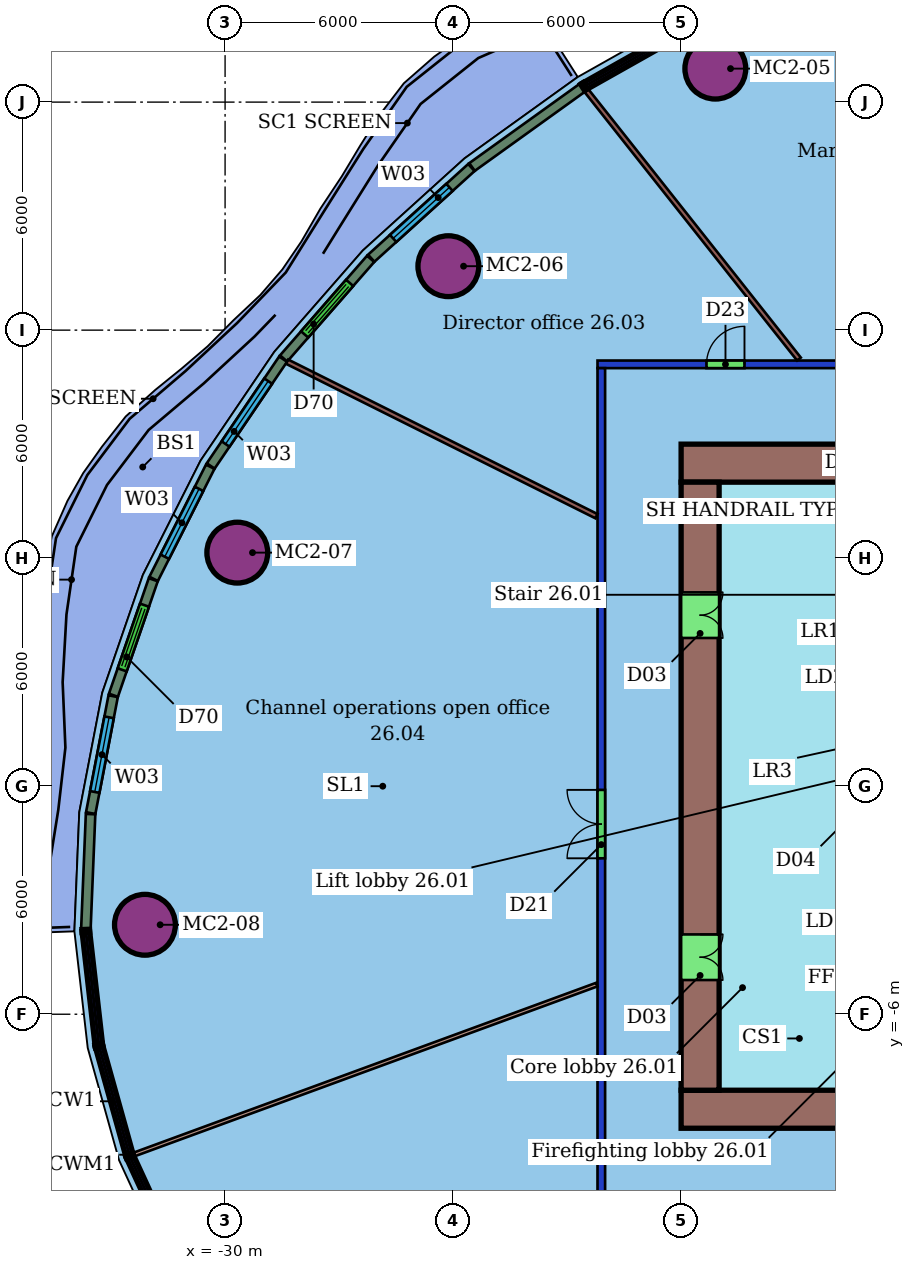
"""IFC4 building model, lengths in metres.
Left out: names, types, materials, properties, quantities, classifications, styles, units other than length and angle.
Written with IfcOpenShell. Run it as: python <this file> out.ifc"""

import sys

from ifc_helpers import new_model, si_unit, direction, frame, frame_2d, origin, origin_2d, place, context, subcontext, project, spatial, rectangle, hollow_circle, extrude, element, fill, save


model = new_model("IFC4")
c1 = context("Model", 3, precision=1e-05, world=origin(), true_north=direction((0.0, 1.0)))
c2 = subcontext(c1, "Body", "Model", "MODEL_VIEW")
j1 = project(units=[si_unit("LENGTHUNIT", "METRE"), si_unit("PLANEANGLEUNIT", "RADIAN")], contexts=[c1])
p1 = place(None, origin())
s1 = spatial("IfcSite", under=j1, at=p1, CompositionType="ELEMENT")
p2 = place(p1, origin())
s2 = spatial("IfcBuilding", under=s1, at=p2, CompositionType="ELEMENT")
p3 = place(p2, frame((0.0, 0.0, 113.8)))
s3 = spatial("IfcBuildingStorey", under=s2, at=p3, CompositionType="ELEMENT", Elevation=113.8)
for number, where, z_axis, x_axis in (
    (1, (-17.1, 18.881, 0.0), (0.0, 0.0, 1.0), (1.0, 0.0, 0.0)),
    (2, (-24.125, 13.683, 0.0), (0.0, 0.0, 1.0), (1.0, 0.0, 0.0)),
    (3, (-29.679, 6.146, 0.0), (0.0, 0.0, 1.0), (1.0, 0.0, 0.0)),
    (4, (-32.109, -3.646, 0.0), (0.0, 0.0, 1.0), (1.0, 0.0, 0.0)),
):
    element("IfcColumn", number, at=place(p3, frame(where, z_axis=z_axis, x_axis=x_axis)), inside=s3, PredefinedType="COLUMN", context=c2, shape_type="SweptSolid", body=[
        extrude(hollow_circle(Radius=0.8, WallThickness=0.055, at=origin_2d()), origin(), (0.0, 0.0, 1.0), 3.45),
    ])
p4 = place(p3, frame((-20.1, -11.0, 0.0), z_axis=(0.0, 0.0, 1.0), x_axis=(0.0, 1.0, 0.0)))
e5 = element("IfcWall", 5, at=p4, inside=s3, PredefinedType="PARTITIONING", context=c2, shape_type="SweptSolid", body=[
    extrude(rectangle(XDim=22.0, YDim=0.2, at=frame_2d((11.0, 0.0))), origin(), (0.0, 0.0, 1.0), 3.0),
])
p5 = place(p4, frame((9.103, 0.0, 0.0)))
e6 = element("IfcOpeningElement", 6, at=p5, cuts=e5, PredefinedType="OPENING", context=c2, shape_type="SweptSolid", body=[
    extrude(rectangle(XDim=1.8, YDim=2.1, at=frame_2d((0.9, 1.05))), frame((0.0, 0.11, 0.0), z_axis=(0.0, -1.0, 0.0), x_axis=(1.0, 0.0, 0.0)), (0.0, 0.0, 1.0), 0.22),
])
p6 = place(p3, frame((-20.2, 11.1, 0.0), z_axis=(0.0, 0.0, 1.0), x_axis=(1.0, 0.0, 0.0)))
e7 = element("IfcWall", 7, at=p6, inside=s3, PredefinedType="PARTITIONING", context=c2, shape_type="SweptSolid", body=[
    extrude(rectangle(XDim=28.4, YDim=0.2, at=frame_2d((14.2, 0.0))), origin(), (0.0, 0.0, 1.0), 3.0),
])
p7 = place(p6, frame((20.417, 0.0, 0.0)))
e8 = element("IfcOpeningElement", 8, at=p7, cuts=e7, PredefinedType="OPENING", context=c2, shape_type="SweptSolid", body=[
    extrude(rectangle(XDim=1.8, YDim=2.1, at=frame_2d((0.9, 1.05))), frame((0.0, 0.11, 0.0), z_axis=(0.0, -1.0, 0.0), x_axis=(1.0, 0.0, 0.0)), (0.0, 0.0, 1.0), 0.22),
])
p8 = place(p6, frame((7.743, 0.0, 0.0)))
e9 = element("IfcOpeningElement", 9, at=p8, cuts=e7, PredefinedType="OPENING", context=c2, shape_type="SweptSolid", body=[
    extrude(rectangle(XDim=1.0, YDim=2.1, at=frame_2d((0.5, 1.05))), frame((0.0, 0.11, 0.0), z_axis=(0.0, -1.0, 0.0), x_axis=(1.0, 0.0, 0.0)), (0.0, 0.0, 1.0), 0.22),
])
p9 = place(p6, frame((2.867, 0.0, 0.0)))
e10 = element("IfcOpeningElement", 10, at=p9, cuts=e7, PredefinedType="OPENING", context=c2, shape_type="SweptSolid", body=[
    extrude(rectangle(XDim=1.0, YDim=2.4, at=frame_2d((0.5, 1.2))), frame((0.0, 0.11, 0.0), z_axis=(0.0, -1.0, 0.0), x_axis=(1.0, 0.0, 0.0)), (0.0, 0.0, 1.0), 0.22),
])
p10 = place(p3, frame((-20.491, 18.302, 0.0), z_axis=(0.0, 0.0, 1.0), x_axis=(0.620744588947, -0.784012854036, 0.0)))
e11 = element("IfcWall", 11, at=p10, inside=s3, PredefinedType="PARTITIONING", context=c2, shape_type="SweptSolid", body=[
    extrude(rectangle(XDim=9.009, YDim=0.125, at=frame_2d((4.505, 0.0))), origin(), (0.0, 0.0, 1.0), 3.45),
])
p11 = place(p3, frame((-28.368, 11.17, 0.0), z_axis=(0.0, 0.0, 1.0), x_axis=(0.894647115325, -0.446773476205, 0.0)))
e12 = element("IfcWall", 12, at=p11, inside=s3, PredefinedType="PARTITIONING", context=c2, shape_type="SweptSolid", body=[
    extrude(rectangle(XDim=9.098, YDim=0.125, at=frame_2d((4.549, 0.0))), origin(), (0.0, 0.0, 1.0), 3.45),
])
p12 = place(p3, frame((-32.393, -9.69, 0.0), z_axis=(0.0, 0.0, 1.0), x_axis=(0.93873651108, 0.344635695722, 0.0)))
e13 = element("IfcWall", 13, at=p12, inside=s3, PredefinedType="PARTITIONING", context=c2, shape_type="SweptSolid", body=[
    extrude(rectangle(XDim=12.97, YDim=0.1, at=frame_2d((6.485, 0.0))), origin(), (0.0, 0.0, 1.0), 3.45),
])
p13 = place(p3, frame((-20.603, 18.375, 0.0), z_axis=(0.0, 0.0, 1.0), x_axis=(-0.812029550547, -0.583616320058, 0.0)))
e14 = element("IfcWall", 14, at=p13, inside=s3, PredefinedType="SOLIDWALL", context=c2, shape_type="SweptSolid", body=[
    extrude(rectangle(XDim=3.57, YDim=0.25, at=frame_2d((1.785, 0.0))), origin(), (0.0, 0.0, 1.0), 3.05),
])
p14 = place(p3, frame((-23.519, 16.278, 0.0), z_axis=(0.0, 0.0, 1.0), x_axis=(-0.7412037287, -0.67128014462, 0.0)))
e15 = element("IfcWall", 15, at=p14, inside=s3, PredefinedType="SOLIDWALL", context=c2, shape_type="SweptSolid", body=[
    extrude(rectangle(XDim=3.554, YDim=0.25, at=frame_2d((1.777, 0.0))), origin(), (0.0, 0.0, 1.0), 3.05),
])
p15 = place(p14, frame((0.777, 0.0, 0.9)))
e16 = element("IfcOpeningElement", 16, at=p15, cuts=e15, PredefinedType="OPENING", context=c2, shape_type="SweptSolid", body=[
    extrude(rectangle(XDim=2.0, YDim=2.1, at=frame_2d((1.0, 1.05))), frame((0.0, 0.135, 0.0), z_axis=(0.0, -1.0, 0.0), x_axis=(1.0, 0.0, 0.0)), (0.0, 0.0, 1.0), 0.27),
])
p16 = place(p3, frame((-26.17, 13.876, 0.0), z_axis=(0.0, 0.0, 1.0), x_axis=(-0.657903433386, -0.753102298721, 0.0)))
e17 = element("IfcWall", 17, at=p16, inside=s3, PredefinedType="SOLIDWALL", context=c2, shape_type="SweptSolid", body=[
    extrude(rectangle(XDim=3.48, YDim=0.25, at=frame_2d((1.74, 0.0))), origin(), (0.0, 0.0, 1.0), 3.05),
])
p17 = place(p16, frame((0.84, 0.0, 0.0)))
e18 = element("IfcOpeningElement", 18, at=p17, cuts=e17, PredefinedType="OPENING", context=c2, shape_type="SweptSolid", body=[
    extrude(rectangle(XDim=1.8, YDim=2.4, at=frame_2d((0.9, 1.2))), frame((0.0, 0.135, 0.0), z_axis=(0.0, -1.0, 0.0), x_axis=(1.0, 0.0, 0.0)), (0.0, 0.0, 1.0), 0.27),
])
p18 = place(p3, frame((-28.473, 11.237, 0.0), z_axis=(0.0, 0.0, 1.0), x_axis=(-0.561237624503, -0.827654715955, 0.0)))
e19 = element("IfcWall", 19, at=p18, inside=s3, PredefinedType="SOLIDWALL", context=c2, shape_type="SweptSolid", body=[
    extrude(rectangle(XDim=3.395, YDim=0.25, at=frame_2d((1.698, 0.0))), origin(), (0.0, 0.0, 1.0), 3.05),
])
p19 = place(p18, frame((0.698, 0.0, 0.9)))
e20 = element("IfcOpeningElement", 20, at=p19, cuts=e19, PredefinedType="OPENING", context=c2, shape_type="SweptSolid", body=[
    extrude(rectangle(XDim=2.0, YDim=2.1, at=frame_2d((1.0, 1.05))), frame((0.0, 0.135, 0.0), z_axis=(0.0, -1.0, 0.0), x_axis=(1.0, 0.0, 0.0)), (0.0, 0.0, 1.0), 0.27),
])
p20 = place(p3, frame((-30.391, 8.406, 0.0), z_axis=(0.0, 0.0, 1.0), x_axis=(-0.450638115992, -0.89270672027, 0.0)))
e21 = element("IfcWall", 21, at=p20, inside=s3, PredefinedType="SOLIDWALL", context=c2, shape_type="SweptSolid", body=[
    extrude(rectangle(XDim=3.305, YDim=0.25, at=frame_2d((1.652, 0.0))), origin(), (0.0, 0.0, 1.0), 3.05),
])
p21 = place(p20, frame((0.652, 0.0, 0.9)))
e22 = element("IfcOpeningElement", 22, at=p21, cuts=e21, PredefinedType="OPENING", context=c2, shape_type="SweptSolid", body=[
    extrude(rectangle(XDim=2.0, YDim=2.1, at=frame_2d((1.0, 1.05))), frame((0.0, 0.135, 0.0), z_axis=(0.0, -1.0, 0.0), x_axis=(1.0, 0.0, 0.0)), (0.0, 0.0, 1.0), 0.27),
])
p22 = place(p3, frame((-31.89, 5.433, 0.0), z_axis=(0.0, 0.0, 1.0), x_axis=(-0.326142792105, -0.945320516628, 0.0)))
e23 = element("IfcWall", 23, at=p22, inside=s3, PredefinedType="SOLIDWALL", context=c2, shape_type="SweptSolid", body=[
    extrude(rectangle(XDim=3.215, YDim=0.25, at=frame_2d((1.607, 0.0))), origin(), (0.0, 0.0, 1.0), 3.05),
])
p23 = place(p22, frame((0.708, 0.0, 0.0)))
e24 = element("IfcOpeningElement", 24, at=p23, cuts=e23, PredefinedType="OPENING", context=c2, shape_type="SweptSolid", body=[
    extrude(rectangle(XDim=1.8, YDim=2.4, at=frame_2d((0.9, 1.2))), frame((0.0, 0.135, 0.0), z_axis=(0.0, -1.0, 0.0), x_axis=(1.0, 0.0, 0.0)), (0.0, 0.0, 1.0), 0.27),
])
p24 = place(p3, frame((-32.945, 2.368, 0.0), z_axis=(0.0, 0.0, 1.0), x_axis=(-0.188780901571, -0.982019231585, 0.0)))
e25 = element("IfcWall", 25, at=p24, inside=s3, PredefinedType="SOLIDWALL", context=c2, shape_type="SweptSolid", body=[
    extrude(rectangle(XDim=3.132, YDim=0.25, at=frame_2d((1.566, 0.0))), origin(), (0.0, 0.0, 1.0), 3.05),
])
p25 = place(p24, frame((0.566, 0.0, 0.9)))
e26 = element("IfcOpeningElement", 26, at=p25, cuts=e25, PredefinedType="OPENING", context=c2, shape_type="SweptSolid", body=[
    extrude(rectangle(XDim=2.0, YDim=2.1, at=frame_2d((1.0, 1.05))), frame((0.0, 0.135, 0.0), z_axis=(0.0, -1.0, 0.0), x_axis=(1.0, 0.0, 0.0)), (0.0, 0.0, 1.0), 0.27),
])
p26 = place(p3, frame((-33.539, -0.734, 0.0), z_axis=(0.0, 0.0, 1.0), x_axis=(-0.04088113468, -0.99916401698, 0.0)))
e27 = element("IfcWall", 27, at=p26, inside=s3, PredefinedType="SOLIDWALL", context=c2, shape_type="SweptSolid", body=[
    extrude(rectangle(XDim=3.022, YDim=0.25, at=frame_2d((1.511, 0.0))), origin(), (0.0, 0.0, 1.0), 3.05),
])
p27 = place(p3, frame((-6.0, 8.5, 0.0), z_axis=(0.0, 0.0, 1.0), x_axis=(-1.0, 0.0, 0.0)))
e28 = element("IfcWall", 28, at=p27, inside=s3, PredefinedType="SHEAR", context=c2, shape_type="SweptSolid", body=[
    extrude(rectangle(XDim=12.0, YDim=1.0, at=frame_2d((6.0, 0.0))), origin(), (0.0, 0.0, 1.0), 3.3),
])
p28 = place(p27, frame((5.2, 0.0, 0.0)))
e29 = element("IfcOpeningElement", 29, at=p28, cuts=e28, PredefinedType="OPENING", context=c2, shape_type="SweptSolid", body=[
    extrude(rectangle(XDim=1.2, YDim=2.1, at=frame_2d((0.6, 1.05))), frame((0.0, 0.51, 0.0), z_axis=(0.0, -1.0, 0.0), x_axis=(1.0, 0.0, 0.0)), (0.0, 0.0, 1.0), 1.02),
])
p29 = place(p3, frame((-18.0, -8.5, 0.0), z_axis=(0.0, 0.0, 1.0), x_axis=(1.0, 0.0, 0.0)))
e30 = element("IfcWall", 30, at=p29, inside=s3, PredefinedType="SHEAR", context=c2, shape_type="SweptSolid", body=[
    extrude(rectangle(XDim=24.0, YDim=1.0, at=frame_2d((12.0, 0.0))), origin(), (0.0, 0.0, 1.0), 3.3),
])
p30 = place(p29, frame((6.0, 0.0, 0.0)))
e31 = element("IfcOpeningElement", 31, at=p30, cuts=e30, PredefinedType="OPENING", context=c2, shape_type="SweptSolid", body=[
    extrude(rectangle(XDim=1.2, YDim=2.1, at=frame_2d((0.6, 1.05))), frame((0.0, 0.51, 0.0), z_axis=(0.0, -1.0, 0.0), x_axis=(1.0, 0.0, 0.0)), (0.0, 0.0, 1.0), 1.02),
])
p31 = place(p3, frame((-17.5, 8.0, 0.0), z_axis=(0.0, 0.0, 1.0), x_axis=(0.0, -1.0, 0.0)))
e32 = element("IfcWall", 32, at=p31, inside=s3, PredefinedType="SHEAR", context=c2, shape_type="SweptSolid", body=[
    extrude(rectangle(XDim=16.0, YDim=1.0, at=frame_2d((8.0, 0.0))), origin(), (0.0, 0.0, 1.0), 3.3),
])
p32 = place(p31, frame((11.9, 0.0, 0.0)))
e33 = element("IfcOpeningElement", 33, at=p32, cuts=e32, PredefinedType="OPENING", context=c2, shape_type="SweptSolid", body=[
    extrude(rectangle(XDim=1.2, YDim=2.1, at=frame_2d((0.6, 1.05))), frame((0.0, 0.51, 0.0), z_axis=(0.0, -1.0, 0.0), x_axis=(1.0, 0.0, 0.0)), (0.0, 0.0, 1.0), 1.02),
])
p33 = place(p31, frame((2.9, 0.0, 0.0)))
e34 = element("IfcOpeningElement", 34, at=p33, cuts=e32, PredefinedType="OPENING", context=c2, shape_type="SweptSolid", body=[
    extrude(rectangle(XDim=1.2, YDim=2.1, at=frame_2d((0.6, 1.05))), frame((0.0, 0.51, 0.0), z_axis=(0.0, -1.0, 0.0), x_axis=(1.0, 0.0, 0.0)), (0.0, 0.0, 1.0), 1.02),
])
p34 = place(p9, origin())
e35 = element("IfcDoor", 35, at=p34, inside=s3, OperationType="SINGLE_SWING_RIGHT", PredefinedType="DOOR", context=c2, shape_type="SweptSolid", body=[
    extrude(rectangle(XDim=1.0, YDim=2.4, at=frame_2d((0.5, 1.2))), frame((0.0, 0.025, 0.0), z_axis=(0.0, -1.0, 0.0), x_axis=(1.0, 0.0, 0.0)), (0.0, 0.0, 1.0), 0.05),
])
fill(e10, e35)
p35 = place(p5, origin())
e36 = element("IfcDoor", 36, at=p35, inside=s3, OperationType="DOUBLE_DOOR_SINGLE_SWING", PredefinedType="DOOR", context=c2, shape_type="SweptSolid", body=[
    extrude(rectangle(XDim=1.8, YDim=2.1, at=frame_2d((0.9, 1.05))), frame((0.0, 0.025, 0.0), z_axis=(0.0, -1.0, 0.0), x_axis=(1.0, 0.0, 0.0)), (0.0, 0.0, 1.0), 0.05),
])
fill(e6, e36)
p36 = place(p15, origin())
e37 = element("IfcWindow", 37, at=p36, inside=s3, PartitioningType="SINGLE_PANEL", PredefinedType="WINDOW", context=c2, shape_type="SweptSolid", body=[
    extrude(rectangle(XDim=2.0, YDim=2.1, at=frame_2d((1.0, 1.05))), frame((0.0, 0.03, 0.0), z_axis=(0.0, -1.0, 0.0), x_axis=(1.0, 0.0, 0.0)), (0.0, 0.0, 1.0), 0.06),
])
fill(e16, e37)
p37 = place(p17, origin())
e38 = element("IfcDoor", 38, at=p37, inside=s3, OperationType="DOUBLE_DOOR_SLIDING", PredefinedType="DOOR", context=c2, shape_type="SweptSolid", body=[
    extrude(rectangle(XDim=1.8, YDim=2.4, at=frame_2d((0.9, 1.2))), frame((0.0, 0.025, 0.0), z_axis=(0.0, -1.0, 0.0), x_axis=(1.0, 0.0, 0.0)), (0.0, 0.0, 1.0), 0.05),
])
fill(e18, e38)
p38 = place(p19, origin())
e39 = element("IfcWindow", 39, at=p38, inside=s3, PartitioningType="SINGLE_PANEL", PredefinedType="WINDOW", context=c2, shape_type="SweptSolid", body=[
    extrude(rectangle(XDim=2.0, YDim=2.1, at=frame_2d((1.0, 1.05))), frame((0.0, 0.03, 0.0), z_axis=(0.0, -1.0, 0.0), x_axis=(1.0, 0.0, 0.0)), (0.0, 0.0, 1.0), 0.06),
])
fill(e20, e39)
p39 = place(p21, origin())
e40 = element("IfcWindow", 40, at=p39, inside=s3, PartitioningType="SINGLE_PANEL", PredefinedType="WINDOW", context=c2, shape_type="SweptSolid", body=[
    extrude(rectangle(XDim=2.0, YDim=2.1, at=frame_2d((1.0, 1.05))), frame((0.0, 0.03, 0.0), z_axis=(0.0, -1.0, 0.0), x_axis=(1.0, 0.0, 0.0)), (0.0, 0.0, 1.0), 0.06),
])
fill(e22, e40)
p40 = place(p23, origin())
e41 = element("IfcDoor", 41, at=p40, inside=s3, OperationType="DOUBLE_DOOR_SLIDING", PredefinedType="DOOR", context=c2, shape_type="SweptSolid", body=[
    extrude(rectangle(XDim=1.8, YDim=2.4, at=frame_2d((0.9, 1.2))), frame((0.0, 0.025, 0.0), z_axis=(0.0, -1.0, 0.0), x_axis=(1.0, 0.0, 0.0)), (0.0, 0.0, 1.0), 0.05),
])
fill(e24, e41)
p41 = place(p25, origin())
e42 = element("IfcWindow", 42, at=p41, inside=s3, PartitioningType="SINGLE_PANEL", PredefinedType="WINDOW", context=c2, shape_type="SweptSolid", body=[
    extrude(rectangle(XDim=2.0, YDim=2.1, at=frame_2d((1.0, 1.05))), frame((0.0, 0.03, 0.0), z_axis=(0.0, -1.0, 0.0), x_axis=(1.0, 0.0, 0.0)), (0.0, 0.0, 1.0), 0.06),
])
fill(e26, e42)
p42 = place(p32, origin())
e43 = element("IfcDoor", 43, at=p42, inside=s3, OperationType="DOUBLE_DOOR_SINGLE_SWING", PredefinedType="NOTDEFINED", context=c2, shape_type="SweptSolid", body=[
    extrude(rectangle(XDim=1.2, YDim=2.1, at=frame_2d((0.6, 1.05))), frame((0.0, 0.025, 0.0), z_axis=(0.0, -1.0, 0.0), x_axis=(1.0, 0.0, 0.0)), (0.0, 0.0, 1.0), 0.05),
])
fill(e33, e43)
p43 = place(p33, origin())
e44 = element("IfcDoor", 44, at=p43, inside=s3, OperationType="DOUBLE_DOOR_SINGLE_SWING", PredefinedType="NOTDEFINED", context=c2, shape_type="SweptSolid", body=[
    extrude(rectangle(XDim=1.2, YDim=2.1, at=frame_2d((0.6, 1.05))), frame((0.0, 0.025, 0.0), z_axis=(0.0, -1.0, 0.0), x_axis=(1.0, 0.0, 0.0)), (0.0, 0.0, 1.0), 0.05),
])
fill(e34, e44)
save(model, sys.argv[1])
